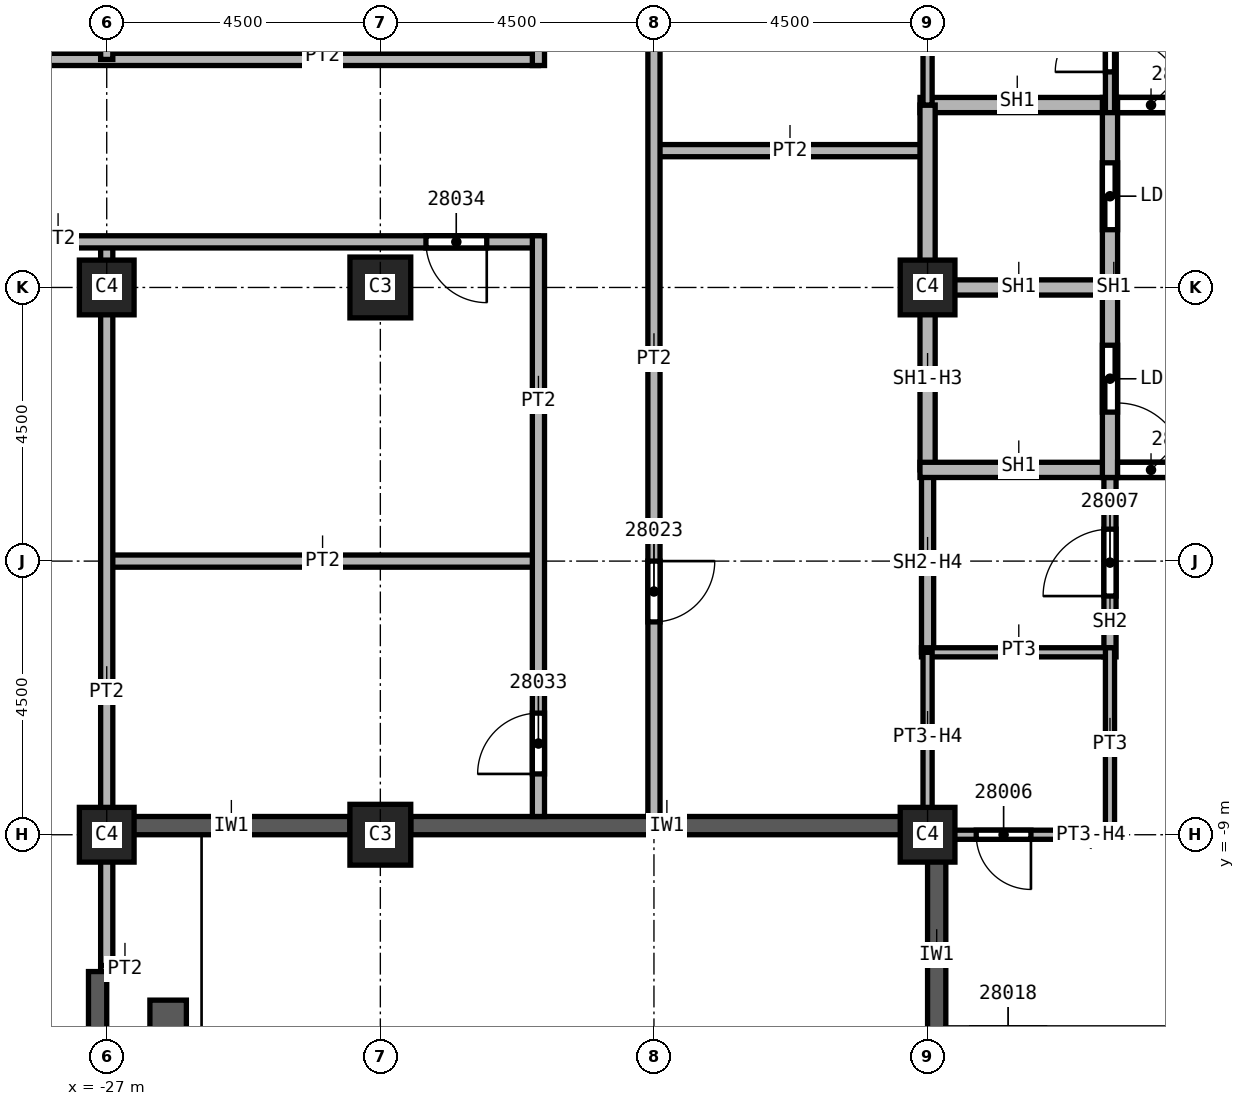
"""IFC4 building model, lengths in metres.
Left out: names, types, materials, properties, quantities, classifications, styles, units other than length and angle.
Written with IfcOpenShell. Run it as: python <this file> out.ifc"""

import sys

from ifc_helpers import new_model, si_unit, direction, frame, frame_2d, origin, origin_2d, place, context, subcontext, project, spatial, rectangle, extrude, element, fill, save


model = new_model("IFC4")
c1 = context("Model", 3, precision=1e-05, world=origin(), true_north=direction((0.0, 1.0)))
c2 = subcontext(c1, "Body", "Model", "MODEL_VIEW")
j1 = project(units=[si_unit("LENGTHUNIT", "METRE"), si_unit("PLANEANGLEUNIT", "RADIAN")], contexts=[c1])
p1 = place(None, origin())
s1 = spatial("IfcSite", under=j1, at=p1, CompositionType="ELEMENT")
p2 = place(p1, origin())
s2 = spatial("IfcBuilding", under=s1, at=p2, CompositionType="ELEMENT")
p3 = place(p2, frame((0.0, 0.0, 236.0)))
s3 = spatial("IfcBuildingStorey", under=s2, at=p3, CompositionType="ELEMENT", Elevation=236.0)
for number, where, z_axis, x_axis in (
    (1, (-22.5, 0.0, 0.0), (0.0, 0.0, 1.0), (1.0, 0.0, 0.0)),
    (2, (-22.5, -9.0, 0.0), (0.0, 0.0, 1.0), (1.0, 0.0, 0.0)),
):
    element("IfcColumn", number, at=place(p3, frame(where, z_axis=z_axis, x_axis=x_axis)), inside=s3, PredefinedType="COLUMN", context=c2, shape_type="SweptSolid", body=[
        extrude(rectangle(XDim=1.0, YDim=1.0, at=origin_2d()), origin(), (0.0, 0.0, 1.0), 5.72),
    ])
for number, where, z_axis, x_axis in (
    (3, (-13.5, 0.0, 0.0), (0.0, 0.0, 1.0), (1.0, 0.0, 0.0)),
    (4, (-13.5, -9.0, 0.0), (0.0, 0.0, 1.0), (1.0, 0.0, 0.0)),
    (5, (-27.0, 0.0, 0.0), (0.0, 0.0, 1.0), (1.0, 0.0, 0.0)),
    (6, (-27.0, -9.0, 0.0), (0.0, 0.0, 1.0), (1.0, 0.0, 0.0)),
):
    element("IfcColumn", number, at=place(p3, frame(where, z_axis=z_axis, x_axis=x_axis)), inside=s3, PredefinedType="COLUMN", context=c2, shape_type="SweptSolid", body=[
        extrude(rectangle(XDim=0.9, YDim=0.9, at=origin_2d()), origin(), (0.0, 0.0, 1.0), 5.72),
    ])
p4 = place(p3, frame((-13.35, -17.5, 0.0), z_axis=(0.0, 0.0, 1.0), x_axis=(0.0, 1.0, 0.0)))
e7 = element("IfcWall", 7, at=p4, inside=s3, PredefinedType="SOLIDWALL", context=c2, shape_type="SweptSolid", body=[
    extrude(rectangle(XDim=8.475, YDim=0.3, at=frame_2d((4.238, 0.0))), origin(), (0.0, 0.0, 1.0), 5.12),
])
p5 = place(p4, frame((3.425, 0.0, 0.0)))
e8 = element("IfcOpeningElement", 8, at=p5, cuts=e7, PredefinedType="OPENING", context=c2, shape_type="SweptSolid", body=[
    extrude(rectangle(XDim=1.2, YDim=2.4, at=frame_2d((0.6, 1.2))), frame((0.0, 0.15, 0.0), z_axis=(0.0, -1.0, 0.0), x_axis=(1.0, 0.0, 0.0)), (0.0, 0.0, 1.0), 0.3),
])
p6 = place(p3, frame((-26.95, -8.85, 0.0), z_axis=(0.0, 0.0, 1.0), x_axis=(1.0, 0.0, 0.0)))
e9 = element("IfcWall", 9, at=p6, inside=s3, PredefinedType="SOLIDWALL", context=c2, shape_type="SweptSolid", body=[
    extrude(rectangle(XDim=3.95, YDim=0.3, at=frame_2d((1.975, 0.0))), origin(), (0.0, 0.0, 1.0), 5.12),
])
p7 = place(p3, frame((-22.0, -8.85, 0.0), z_axis=(0.0, 0.0, 1.0), x_axis=(1.0, 0.0, 0.0)))
e10 = element("IfcWall", 10, at=p7, inside=s3, PredefinedType="SOLIDWALL", context=c2, shape_type="SweptSolid", body=[
    extrude(rectangle(XDim=8.475, YDim=0.3, at=frame_2d((4.238, 0.0))), origin(), (0.0, 0.0, 1.0), 5.12),
])
p8 = place(p3, frame((-25.99, -14.72, 0.0), z_axis=(0.0, 0.0, 1.0), x_axis=(0.0, 1.0, 0.0)))
e11 = element("IfcWall", 11, at=p8, inside=s3, PredefinedType="SOLIDWALL", context=c2, shape_type="SweptSolid", body=[
    extrude(rectangle(XDim=3.0, YDim=0.6, at=frame_2d((1.5, 0.0))), origin(), (0.0, 0.0, 1.0), 0.54),
])
p9 = place(p3, frame((-33.85, 3.75, 0.0), z_axis=(0.0, 0.0, 1.0), x_axis=(1.0, 0.0, 0.0)))
e12 = element("IfcWall", 12, at=p9, inside=s3, PredefinedType="PARTITIONING", context=c2, shape_type="SweptSolid", body=[
    extrude(rectangle(XDim=13.95, YDim=0.2, at=frame_2d((6.975, 0.0))), origin(), (0.0, 0.0, 1.0), 5.72),
])
p10 = place(p3, frame((-27.1, -4.5, 0.0), z_axis=(0.0, 0.0, 1.0), x_axis=(1.0, 0.0, 0.0)))
e13 = element("IfcWall", 13, at=p10, inside=s3, PredefinedType="PARTITIONING", context=c2, shape_type="SweptSolid", body=[
    extrude(rectangle(XDim=7.2, YDim=0.2, at=frame_2d((3.6, 0.0))), origin(), (0.0, 0.0, 1.0), 5.72),
])
p11 = place(p3, frame((-27.0, -11.25, 0.0), z_axis=(0.0, 0.0, 1.0), x_axis=(0.0, 1.0, 0.0)))
e14 = element("IfcWall", 14, at=p11, inside=s3, PredefinedType="PARTITIONING", context=c2, shape_type="SweptSolid", body=[
    extrude(rectangle(XDim=12.0, YDim=0.2, at=frame_2d((6.0, 0.0))), origin(), (0.0, 0.0, 1.0), 5.72),
])
p12 = place(p3, frame((-27.0, 3.75, 0.0), z_axis=(0.0, 0.0, 1.0), x_axis=(0.0, 1.0, 0.0)))
e15 = element("IfcWall", 15, at=p12, inside=s3, PredefinedType="PARTITIONING", context=c2, shape_type="SweptSolid", body=[
    extrude(rectangle(XDim=13.75, YDim=0.2, at=frame_2d((6.875, 0.0))), origin(), (0.0, 0.0, 1.0), 5.72),
])
p13 = place(p3, frame((-19.9, 0.75, 0.0), z_axis=(0.0, 0.0, 1.0), x_axis=(-1.0, 0.0, 0.0)))
e16 = element("IfcWall", 16, at=p13, inside=s3, PredefinedType="PARTITIONING", context=c2, shape_type="SweptSolid", body=[
    extrude(rectangle(XDim=13.95, YDim=0.2, at=frame_2d((6.975, 0.0))), origin(), (0.0, 0.0, 1.0), 5.72),
])
p14 = place(p13, frame((0.85, 0.0, 0.0)))
e17 = element("IfcOpeningElement", 17, at=p14, cuts=e16, PredefinedType="OPENING", context=c2, shape_type="SweptSolid", body=[
    extrude(rectangle(XDim=1.0, YDim=2.1, at=frame_2d((0.5, 1.05))), frame((0.0, 0.1, 0.0), z_axis=(0.0, -1.0, 0.0), x_axis=(1.0, 0.0, 0.0)), (0.0, 0.0, 1.0), 0.2),
])
p15 = place(p3, frame((-26.5, -11.25, 0.0), z_axis=(0.0, 0.0, 1.0), x_axis=(-1.0, 0.0, 0.0)))
e18 = element("IfcWall", 18, at=p15, inside=s3, PredefinedType="PARTITIONING", context=c2, shape_type="SweptSolid", body=[
    extrude(rectangle(XDim=0.6, YDim=0.2, at=frame_2d((0.3, 0.0))), origin(), (0.0, 0.0, 1.0), 5.72),
])
p16 = place(p3, frame((-19.9, -8.7, 0.0), z_axis=(0.0, 0.0, 1.0), x_axis=(0.0, 1.0, 0.0)))
e19 = element("IfcWall", 19, at=p16, inside=s3, PredefinedType="PARTITIONING", context=c2, shape_type="SweptSolid", body=[
    extrude(rectangle(XDim=9.55, YDim=0.2, at=frame_2d((4.775, 0.0))), origin(), (0.0, 0.0, 1.0), 5.72),
])
p17 = place(p16, frame((0.7, 0.0, 0.0)))
e20 = element("IfcOpeningElement", 20, at=p17, cuts=e19, PredefinedType="OPENING", context=c2, shape_type="SweptSolid", body=[
    extrude(rectangle(XDim=1.0, YDim=2.1, at=frame_2d((0.5, 1.05))), frame((0.0, 0.1, 0.0), z_axis=(0.0, -1.0, 0.0), x_axis=(1.0, 0.0, 0.0)), (0.0, 0.0, 1.0), 0.2),
])
p18 = place(p3, frame((-19.9, 3.65, 0.0), z_axis=(0.0, 0.0, 1.0), x_axis=(0.0, 1.0, 0.0)))
e21 = element("IfcWall", 21, at=p18, inside=s3, PredefinedType="PARTITIONING", context=c2, shape_type="SweptSolid", body=[
    extrude(rectangle(XDim=9.95, YDim=0.2, at=frame_2d((4.975, 0.0))), origin(), (0.0, 0.0, 1.0), 5.72),
])
p19 = place(p18, frame((4.3, 0.0, 0.0)))
e22 = element("IfcOpeningElement", 22, at=p19, cuts=e21, PredefinedType="OPENING", context=c2, shape_type="SweptSolid", body=[
    extrude(rectangle(XDim=1.0, YDim=2.1, at=frame_2d((0.5, 1.05))), frame((0.0, 0.1, 0.0), z_axis=(0.0, -1.0, 0.0), x_axis=(1.0, 0.0, 0.0)), (0.0, 0.0, 1.0), 0.2),
])
p20 = place(p18, frame((8.2, 0.0, 0.0)))
e23 = element("IfcOpeningElement", 23, at=p20, cuts=e21, PredefinedType="OPENING", context=c2, shape_type="SweptSolid", body=[
    extrude(rectangle(XDim=1.0, YDim=2.1, at=frame_2d((0.5, 1.05))), frame((0.0, 0.1, 0.0), z_axis=(0.0, -1.0, 0.0), x_axis=(1.0, 0.0, 0.0)), (0.0, 0.0, 1.0), 0.2),
])
p21 = place(p3, frame((-18.0, 2.25, 0.0), z_axis=(0.0, 0.0, 1.0), x_axis=(1.0, 0.0, 0.0)))
e24 = element("IfcWall", 24, at=p21, inside=s3, PredefinedType="PARTITIONING", context=c2, shape_type="SweptSolid", body=[
    extrude(rectangle(XDim=4.5, YDim=0.2, at=frame_2d((2.25, 0.0))), origin(), (0.0, 0.0, 1.0), 5.72),
])
p22 = place(p3, frame((-18.0, 9.1, 0.0), z_axis=(0.0, 0.0, 1.0), x_axis=(0.0, -1.0, 0.0)))
e25 = element("IfcWall", 25, at=p22, inside=s3, PredefinedType="PARTITIONING", context=c2, shape_type="SweptSolid", body=[
    extrude(rectangle(XDim=17.8, YDim=0.2, at=frame_2d((8.9, 0.0))), origin(), (0.0, 0.0, 1.0), 5.72),
])
p23 = place(p22, frame((13.6, 0.0, 0.0)))
e26 = element("IfcOpeningElement", 26, at=p23, cuts=e25, PredefinedType="OPENING", context=c2, shape_type="SweptSolid", body=[
    extrude(rectangle(XDim=1.0, YDim=2.1, at=frame_2d((0.5, 1.05))), frame((0.0, 0.1, 0.0), z_axis=(0.0, -1.0, 0.0), x_axis=(1.0, 0.0, 0.0)), (0.0, 0.0, 1.0), 0.2),
])
p24 = place(p22, frame((3.85, 0.0, 0.0)))
e27 = element("IfcOpeningElement", 27, at=p24, cuts=e25, PredefinedType="OPENING", context=c2, shape_type="SweptSolid", body=[
    extrude(rectangle(XDim=1.0, YDim=2.1, at=frame_2d((0.5, 1.05))), frame((0.0, 0.1, 0.0), z_axis=(0.0, -1.0, 0.0), x_axis=(1.0, 0.0, 0.0)), (0.0, 0.0, 1.0), 0.2),
])
p25 = place(p3, frame((-13.5, -6.0, 0.0), z_axis=(0.0, 0.0, 1.0), x_axis=(0.0, 1.0, 0.0)))
e28 = element("IfcWall", 28, at=p25, inside=s3, PredefinedType="SOLIDWALL", context=c2, shape_type="SweptSolid", body=[
    extrude(rectangle(XDim=3.0, YDim=0.2, at=frame_2d((1.5, 0.0))), origin(), (0.0, 0.0, 1.0), 5.042),
])
p26 = place(p3, frame((-10.5, -6.075, 0.0), z_axis=(0.0, 0.0, 1.0), x_axis=(0.0, 1.0, 0.0)))
e29 = element("IfcWall", 29, at=p26, inside=s3, PredefinedType="SOLIDWALL", context=c2, shape_type="SweptSolid", body=[
    extrude(rectangle(XDim=3.2, YDim=0.2, at=frame_2d((1.6, 0.0))), origin(), (0.0, 0.0, 1.0), 5.72),
])
p27 = place(p26, frame((1.0, 0.0, 0.0)))
e30 = element("IfcOpeningElement", 30, at=p27, cuts=e29, PredefinedType="OPENING", context=c2, shape_type="SweptSolid", body=[
    extrude(rectangle(XDim=1.1, YDim=2.1, at=frame_2d((0.55, 1.05))), frame((0.0, 0.1, 0.0), z_axis=(0.0, -1.0, 0.0), x_axis=(1.0, 0.0, 0.0)), (0.0, 0.0, 1.0), 0.2),
])
p28 = place(p3, frame((-13.625, 0.0, 0.0), z_axis=(0.0, 0.0, 1.0), x_axis=(1.0, 0.0, 0.0)))
e31 = element("IfcWall", 31, at=p28, inside=s3, PredefinedType="SOLIDWALL", context=c2, shape_type="SweptSolid", body=[
    extrude(rectangle(XDim=3.125, YDim=0.25, at=frame_2d((1.562, 0.0))), origin(), (0.0, 0.0, 1.0), 5.72),
])
p29 = place(p3, frame((-13.625, 3.0, 0.0), z_axis=(0.0, 0.0, 1.0), x_axis=(1.0, 0.0, 0.0)))
e32 = element("IfcWall", 32, at=p29, inside=s3, PredefinedType="SOLIDWALL", context=c2, shape_type="SweptSolid", body=[
    extrude(rectangle(XDim=9.25, YDim=0.25, at=frame_2d((4.625, 0.0))), origin(), (0.0, 0.0, 1.0), 5.72),
])
p30 = place(p29, frame((3.25, 0.0, 0.0)))
e33 = element("IfcOpeningElement", 33, at=p30, cuts=e32, PredefinedType="OPENING", context=c2, shape_type="SweptSolid", body=[
    extrude(rectangle(XDim=1.1, YDim=2.1, at=frame_2d((0.55, 1.05))), frame((0.0, 0.125, 0.0), z_axis=(0.0, -1.0, 0.0), x_axis=(1.0, 0.0, 0.0)), (0.0, 0.0, 1.0), 0.25),
])
p31 = place(p3, frame((-13.5, -3.0, 0.0), z_axis=(0.0, 0.0, 1.0), x_axis=(0.0, 1.0, 0.0)))
e34 = element("IfcWall", 34, at=p31, inside=s3, PredefinedType="SOLIDWALL", context=c2, shape_type="SweptSolid", body=[
    extrude(rectangle(XDim=6.0, YDim=0.25, at=frame_2d((3.0, 0.0))), origin(), (0.0, 0.0, 1.0), 5.042),
])
p32 = place(p3, frame((-13.625, -3.0, 0.0), z_axis=(0.0, 0.0, 1.0), x_axis=(1.0, 0.0, 0.0)))
e35 = element("IfcWall", 35, at=p32, inside=s3, PredefinedType="SOLIDWALL", context=c2, shape_type="SweptSolid", body=[
    extrude(rectangle(XDim=6.125, YDim=0.25, at=frame_2d((3.062, 0.0))), origin(), (0.0, 0.0, 1.0), 5.72),
])
p33 = place(p32, frame((3.25, 0.0, 0.0)))
e36 = element("IfcOpeningElement", 36, at=p33, cuts=e35, PredefinedType="OPENING", context=c2, shape_type="SweptSolid", body=[
    extrude(rectangle(XDim=1.1, YDim=2.1, at=frame_2d((0.55, 1.05))), frame((0.0, 0.125, 0.0), z_axis=(0.0, -1.0, 0.0), x_axis=(1.0, 0.0, 0.0)), (0.0, 0.0, 1.0), 0.25),
])
p34 = place(p3, frame((-10.5, -3.125, 0.0), z_axis=(0.0, 0.0, 1.0), x_axis=(0.0, 1.0, 0.0)))
e37 = element("IfcWall", 37, at=p34, inside=s3, PredefinedType="SOLIDWALL", context=c2, shape_type="SweptSolid", body=[
    extrude(rectangle(XDim=6.25, YDim=0.25, at=frame_2d((3.125, 0.0))), origin(), (0.0, 0.0, 1.0), 5.72),
])
p35 = place(p34, frame((1.075, 0.0, 0.0)))
e38 = element("IfcOpeningElement", 38, at=p35, cuts=e37, PredefinedType="OPENING", context=c2, shape_type="SweptSolid", body=[
    extrude(rectangle(XDim=1.1, YDim=2.1, at=frame_2d((0.55, 1.05))), frame((0.0, 0.125, 0.0), z_axis=(0.0, -1.0, 0.0), x_axis=(1.0, 0.0, 0.0)), (0.0, 0.0, 1.0), 0.25),
])
p36 = place(p34, frame((4.075, 0.0, 0.0)))
e39 = element("IfcOpeningElement", 39, at=p36, cuts=e37, PredefinedType="OPENING", context=c2, shape_type="SweptSolid", body=[
    extrude(rectangle(XDim=1.1, YDim=2.1, at=frame_2d((0.55, 1.05))), frame((0.0, 0.125, 0.0), z_axis=(0.0, -1.0, 0.0), x_axis=(1.0, 0.0, 0.0)), (0.0, 0.0, 1.0), 0.25),
])
p37 = place(p3, frame((-13.6, -6.0, 0.0), z_axis=(0.0, 0.0, 1.0), x_axis=(1.0, 0.0, 0.0)))
e40 = element("IfcWall", 40, at=p37, inside=s3, PredefinedType="PARTITIONING", context=c2, shape_type="SweptSolid", body=[
    extrude(rectangle(XDim=3.1, YDim=0.15, at=frame_2d((1.55, 0.0))), origin(), (0.0, 0.0, 1.0), 5.72),
])
p38 = place(p3, frame((-13.5, -9.0, 0.0), z_axis=(0.0, 0.0, 1.0), x_axis=(0.0, 1.0, 0.0)))
e41 = element("IfcWall", 41, at=p38, inside=s3, PredefinedType="PARTITIONING", context=c2, shape_type="SweptSolid", body=[
    extrude(rectangle(XDim=3.0, YDim=0.15, at=frame_2d((1.5, 0.0))), origin(), (0.0, 0.0, 1.0), 5.042),
])
p39 = place(p3, frame((-13.5, 3.0, 0.0), z_axis=(0.0, 0.0, 1.0), x_axis=(0.0, 1.0, 0.0)))
e42 = element("IfcWall", 42, at=p39, inside=s3, PredefinedType="PARTITIONING", context=c2, shape_type="SweptSolid", body=[
    extrude(rectangle(XDim=2.0, YDim=0.15, at=frame_2d((1.0, 0.0))), origin(), (0.0, 0.0, 1.0), 5.042),
])
p40 = place(p3, frame((-10.5, -9.075, 0.0), z_axis=(0.0, 0.0, 1.0), x_axis=(0.0, 1.0, 0.0)))
e43 = element("IfcWall", 43, at=p40, inside=s3, PredefinedType="PARTITIONING", context=c2, shape_type="SweptSolid", body=[
    extrude(rectangle(XDim=3.15, YDim=0.15, at=frame_2d((1.575, 0.0))), origin(), (0.0, 0.0, 1.0), 5.72),
])
p41 = place(p3, frame((-10.5, -9.0, 0.0), z_axis=(0.0, 0.0, 1.0), x_axis=(-1.0, 0.0, 0.0)))
e44 = element("IfcWall", 44, at=p41, inside=s3, PredefinedType="PARTITIONING", context=c2, shape_type="SweptSolid", body=[
    extrude(rectangle(XDim=3.025, YDim=0.15, at=frame_2d((1.512, 0.0))), origin(), (0.0, 0.0, 1.0), 5.042),
])
p42 = place(p41, frame((1.3, 0.0, 0.0)))
e45 = element("IfcOpeningElement", 45, at=p42, cuts=e44, PredefinedType="OPENING", context=c2, shape_type="SweptSolid", body=[
    extrude(rectangle(XDim=0.9, YDim=2.1, at=frame_2d((0.45, 1.05))), frame((0.0, 0.075, 0.0), z_axis=(0.0, -1.0, 0.0), x_axis=(1.0, 0.0, 0.0)), (0.0, 0.0, 1.0), 0.15),
])
p43 = place(p3, frame((-10.5, 2.875, 0.0), z_axis=(0.0, 0.0, 1.0), x_axis=(0.0, 1.0, 0.0)))
e46 = element("IfcWall", 46, at=p43, inside=s3, PredefinedType="PARTITIONING", context=c2, shape_type="SweptSolid", body=[
    extrude(rectangle(XDim=2.2, YDim=0.15, at=frame_2d((1.1, 0.0))), origin(), (0.0, 0.0, 1.0), 5.72),
])
p44 = place(p43, frame((0.67, 0.0, 0.0)))
e47 = element("IfcOpeningElement", 47, at=p44, cuts=e46, PredefinedType="OPENING", context=c2, shape_type="SweptSolid", body=[
    extrude(rectangle(XDim=0.9, YDim=2.1, at=frame_2d((0.45, 1.05))), frame((0.0, 0.075, 0.0), z_axis=(0.0, -1.0, 0.0), x_axis=(1.0, 0.0, 0.0)), (0.0, 0.0, 1.0), 0.15),
])
p45 = place(p3, frame((-27.15, -17.55, 0.0), z_axis=(0.0, 0.0, 1.0), x_axis=(0.0, 1.0, 0.0)))
e48 = element("IfcWall", 48, at=p45, inside=s3, PredefinedType="SOLIDWALL", context=c2, shape_type="SweptSolid", body=[
    extrude(rectangle(XDim=6.3, YDim=0.3, at=frame_2d((3.15, 0.0))), origin(), (0.0, 0.0, 1.0), 5.12),
])
p46 = place(p33, origin())
e49 = element("IfcDoor", 49, at=p46, inside=s3, OperationType="SINGLE_SWING_LEFT", PredefinedType="DOOR", context=c2, shape_type="SweptSolid", body=[
    extrude(rectangle(XDim=1.1, YDim=2.1, at=frame_2d((0.55, 1.05))), frame((0.0, 0.025, 0.0), z_axis=(0.0, -1.0, 0.0), x_axis=(1.0, 0.0, 0.0)), (0.0, 0.0, 1.0), 0.05),
])
fill(e36, e49)
p47 = place(p30, origin())
e50 = element("IfcDoor", 50, at=p47, inside=s3, OperationType="SINGLE_SWING_RIGHT", PredefinedType="DOOR", context=c2, shape_type="SweptSolid", body=[
    extrude(rectangle(XDim=1.1, YDim=2.1, at=frame_2d((0.55, 1.05))), frame((0.0, 0.025, 0.0), z_axis=(0.0, -1.0, 0.0), x_axis=(1.0, 0.0, 0.0)), (0.0, 0.0, 1.0), 0.05),
])
fill(e33, e50)
p48 = place(p42, origin())
e51 = element("IfcDoor", 51, at=p48, inside=s3, OperationType="SINGLE_SWING_LEFT", PredefinedType="DOOR", context=c2, shape_type="SweptSolid", body=[
    extrude(rectangle(XDim=0.9, YDim=2.1, at=frame_2d((0.45, 1.05))), frame((0.0, 0.025, 0.0), z_axis=(0.0, -1.0, 0.0), x_axis=(1.0, 0.0, 0.0)), (0.0, 0.0, 1.0), 0.05),
])
fill(e45, e51)
p49 = place(p27, origin())
e52 = element("IfcDoor", 52, at=p49, inside=s3, OperationType="SINGLE_SWING_RIGHT", PredefinedType="DOOR", context=c2, shape_type="SweptSolid", body=[
    extrude(rectangle(XDim=1.1, YDim=2.1, at=frame_2d((0.55, 1.05))), frame((0.0, 0.025, 0.0), z_axis=(0.0, -1.0, 0.0), x_axis=(1.0, 0.0, 0.0)), (0.0, 0.0, 1.0), 0.05),
])
fill(e30, e52)
p50 = place(p23, origin())
e53 = element("IfcDoor", 53, at=p50, inside=s3, OperationType="SINGLE_SWING_RIGHT", PredefinedType="DOOR", context=c2, shape_type="SweptSolid", body=[
    extrude(rectangle(XDim=1.0, YDim=2.1, at=frame_2d((0.5, 1.05))), frame((0.0, 0.025, 0.0), z_axis=(0.0, -1.0, 0.0), x_axis=(1.0, 0.0, 0.0)), (0.0, 0.0, 1.0), 0.05),
])
fill(e26, e53)
p51 = place(p17, origin())
e54 = element("IfcDoor", 54, at=p51, inside=s3, OperationType="SINGLE_SWING_RIGHT", PredefinedType="DOOR", context=c2, shape_type="SweptSolid", body=[
    extrude(rectangle(XDim=1.0, YDim=2.1, at=frame_2d((0.5, 1.05))), frame((0.0, 0.025, 0.0), z_axis=(0.0, -1.0, 0.0), x_axis=(1.0, 0.0, 0.0)), (0.0, 0.0, 1.0), 0.05),
])
fill(e20, e54)
p52 = place(p14, origin())
e55 = element("IfcDoor", 55, at=p52, inside=s3, OperationType="SINGLE_SWING_LEFT", PredefinedType="DOOR", context=c2, shape_type="SweptSolid", body=[
    extrude(rectangle(XDim=1.0, YDim=2.1, at=frame_2d((0.5, 1.05))), frame((0.0, 0.025, 0.0), z_axis=(0.0, -1.0, 0.0), x_axis=(1.0, 0.0, 0.0)), (0.0, 0.0, 1.0), 0.05),
])
fill(e17, e55)
p53 = place(p44, origin())
e56 = element("IfcDoor", 56, at=p53, inside=s3, OperationType="SINGLE_SWING_LEFT", PredefinedType="DOOR", context=c2, shape_type="SweptSolid", body=[
    extrude(rectangle(XDim=0.9, YDim=2.1, at=frame_2d((0.45, 1.05))), frame((0.0, 0.025, 0.0), z_axis=(0.0, -1.0, 0.0), x_axis=(1.0, 0.0, 0.0)), (0.0, 0.0, 1.0), 0.05),
])
fill(e47, e56)
p54 = place(p35, origin())
e57 = element("IfcDoor", 57, at=p54, inside=s3, OperationType="SLIDING_TO_LEFT", PredefinedType="DOOR", context=c2, shape_type="SweptSolid", body=[
    extrude(rectangle(XDim=1.1, YDim=2.1, at=frame_2d((0.55, 1.05))), frame((0.0, 0.025, 0.0), z_axis=(0.0, -1.0, 0.0), x_axis=(1.0, 0.0, 0.0)), (0.0, 0.0, 1.0), 0.05),
])
fill(e38, e57)
p55 = place(p36, origin())
e58 = element("IfcDoor", 58, at=p55, inside=s3, OperationType="SLIDING_TO_LEFT", PredefinedType="DOOR", context=c2, shape_type="SweptSolid", body=[
    extrude(rectangle(XDim=1.1, YDim=2.1, at=frame_2d((0.55, 1.05))), frame((0.0, 0.025, 0.0), z_axis=(0.0, -1.0, 0.0), x_axis=(1.0, 0.0, 0.0)), (0.0, 0.0, 1.0), 0.05),
])
fill(e39, e58)
save(model, sys.argv[1])
